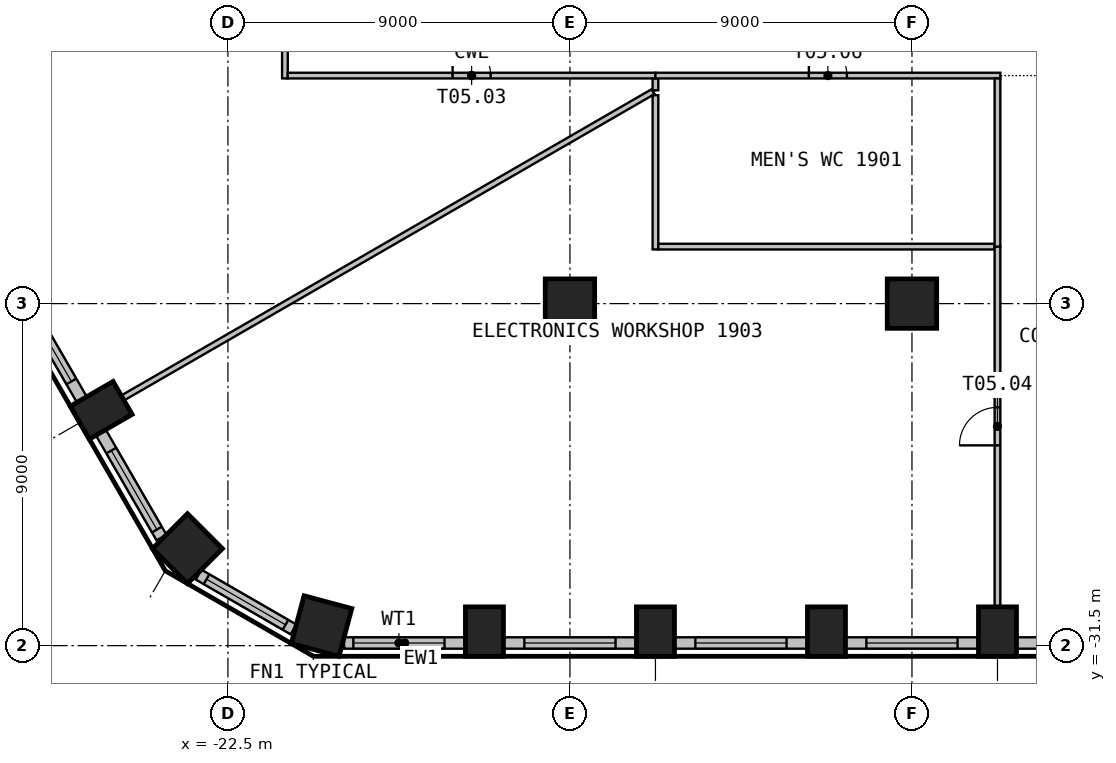
"""IFC4 building model, lengths in metres.
Left out: names, types, materials, properties, quantities, classifications, styles, units other than length and angle.
Written with IfcOpenShell. Run it as: python <this file> out.ifc"""

import sys

from ifc_helpers import new_model, si_unit, direction, frame, frame_2d, origin, origin_2d, place, context, subcontext, project, spatial, rectangle, circle, extrude, element, fill, save


model = new_model("IFC4")
c1 = context("Model", 3, precision=1e-05, world=origin(), true_north=direction((0.0, 1.0)))
c2 = subcontext(c1, "Body", "Model", "MODEL_VIEW")
j1 = project(units=[si_unit("LENGTHUNIT", "METRE"), si_unit("PLANEANGLEUNIT", "RADIAN")], contexts=[c1])
p1 = place(None, origin())
s1 = spatial("IfcSite", under=j1, at=p1, CompositionType="ELEMENT")
p2 = place(p1, origin())
s2 = spatial("IfcBuilding", under=s1, at=p2, CompositionType="ELEMENT")
p3 = place(p2, frame((0.0, 0.0, 81.3)))
s3 = spatial("IfcBuildingStorey", under=s2, at=p3, CompositionType="ELEMENT", Elevation=81.3)
p4 = place(p3, frame((-20.037, -30.984, 0.0), z_axis=(0.0, 0.0, 1.0), x_axis=(0.965925826289, -0.258819045103, 0.0)))
e1 = element("IfcColumn", 1, at=p4, inside=s3, PredefinedType="COLUMN", context=c2, shape_type="SweptSolid", body=[
    extrude(rectangle(XDim=1.3, YDim=1.3, at=origin_2d()), origin(), (0.0, 0.0, 1.0), 3.525),
])
for number, where, z_axis, x_axis in (
    (2, (-15.75, -31.13, 0.0), (0.0, 0.0, 1.0), (1.0, 0.0, 0.0)),
    (3, (-11.25, -31.13, 0.0), (0.0, 0.0, 1.0), (1.0, 0.0, 0.0)),
    (4, (-6.75, -31.13, 0.0), (0.0, 0.0, 1.0), (1.0, 0.0, 0.0)),
    (5, (-2.25, -31.13, 0.0), (0.0, 0.0, 1.0), (1.0, 0.0, 0.0)),
    (6, (-25.834, -25.308, 0.0), (0.0, 0.0, 1.0), (0.5, -0.866, 0.0)),
):
    element("IfcColumn", number, at=place(p3, frame(where, z_axis=z_axis, x_axis=x_axis)), inside=s3, PredefinedType="COLUMN", context=c2, shape_type="SweptSolid", body=[
        extrude(rectangle(XDim=1.0, YDim=1.3, at=origin_2d()), origin(), (0.0, 0.0, 1.0), 3.525),
    ])
p5 = place(p3, frame((-23.564, -28.947, 0.0), z_axis=(0.0, 0.0, 1.0), x_axis=(0.707106781187, -0.707106781187, 0.0)))
e7 = element("IfcColumn", 7, at=p5, inside=s3, PredefinedType="COLUMN", context=c2, shape_type="SweptSolid", body=[
    extrude(rectangle(XDim=1.3, YDim=1.3, at=origin_2d()), origin(), (0.0, 0.0, 1.0), 3.525),
])
for number, where, z_axis, x_axis in (
    (8, (-13.5, -22.5, 0.0), (0.0, 0.0, 1.0), (1.0, 0.0, 0.0)),
    (9, (-4.5, -22.5, 0.0), (0.0, 0.0, 1.0), (1.0, 0.0, 0.0)),
):
    element("IfcColumn", number, at=place(p3, frame(where, z_axis=z_axis, x_axis=x_axis)), inside=s3, PredefinedType="COLUMN", context=c2, shape_type="SweptSolid", body=[
        extrude(circle(Radius=0.65, at=origin_2d()), origin(), (0.0, 0.0, 1.0), 3.525),
    ])
p6 = place(p3, frame((-19.443, -31.43, 0.0), z_axis=(0.0, 0.0, 1.0), x_axis=(1.0, 0.0, 0.0)))
e10 = element("IfcWall", 10, at=p6, inside=s3, PredefinedType="SOLIDWALL", context=c2, shape_type="SweptSolid", body=[
    extrude(rectangle(XDim=3.192, YDim=0.3, at=frame_2d((1.596, 0.0))), origin(), (0.0, 0.0, 1.0), 3.525),
])
p7 = place(p6, frame((0.243, 0.0, 0.9)))
e11 = element("IfcOpeningElement", 11, at=p7, cuts=e10, PredefinedType="OPENING", context=c2, shape_type="SweptSolid", body=[
    extrude(rectangle(XDim=2.4, YDim=2.1, at=frame_2d((1.2, 1.05))), frame((0.0, 0.16, 0.0), z_axis=(0.0, -1.0, 0.0), x_axis=(1.0, 0.0, 0.0)), (0.0, 0.0, 1.0), 0.32),
])
p8 = place(p3, frame((-15.25, -31.43, 0.0), z_axis=(0.0, 0.0, 1.0), x_axis=(1.0, 0.0, 0.0)))
e12 = element("IfcWall", 12, at=p8, inside=s3, PredefinedType="SOLIDWALL", context=c2, shape_type="SweptSolid", body=[
    extrude(rectangle(XDim=3.499, YDim=0.3, at=frame_2d((1.75, 0.0))), origin(), (0.0, 0.0, 1.0), 3.525),
])
p9 = place(p8, frame((0.55, 0.0, 0.9)))
e13 = element("IfcOpeningElement", 13, at=p9, cuts=e12, PredefinedType="OPENING", context=c2, shape_type="SweptSolid", body=[
    extrude(rectangle(XDim=2.4, YDim=2.1, at=frame_2d((1.2, 1.05))), frame((0.0, 0.16, 0.0), z_axis=(0.0, -1.0, 0.0), x_axis=(1.0, 0.0, 0.0)), (0.0, 0.0, 1.0), 0.32),
])
p10 = place(p3, frame((-10.75, -31.43, 0.0), z_axis=(0.0, 0.0, 1.0), x_axis=(1.0, 0.0, 0.0)))
e14 = element("IfcWall", 14, at=p10, inside=s3, PredefinedType="SOLIDWALL", context=c2, shape_type="SweptSolid", body=[
    extrude(rectangle(XDim=3.499, YDim=0.3, at=frame_2d((1.75, 0.0))), origin(), (0.0, 0.0, 1.0), 3.525),
])
p11 = place(p10, frame((0.55, 0.0, 0.9)))
e15 = element("IfcOpeningElement", 15, at=p11, cuts=e14, PredefinedType="OPENING", context=c2, shape_type="SweptSolid", body=[
    extrude(rectangle(XDim=2.4, YDim=2.1, at=frame_2d((1.2, 1.05))), frame((0.0, 0.16, 0.0), z_axis=(0.0, -1.0, 0.0), x_axis=(1.0, 0.0, 0.0)), (0.0, 0.0, 1.0), 0.32),
])
p12 = place(p3, frame((-6.25, -31.43, 0.0), z_axis=(0.0, 0.0, 1.0), x_axis=(1.0, 0.0, 0.0)))
e16 = element("IfcWall", 16, at=p12, inside=s3, PredefinedType="SOLIDWALL", context=c2, shape_type="SweptSolid", body=[
    extrude(rectangle(XDim=3.499, YDim=0.3, at=frame_2d((1.75, 0.0))), origin(), (0.0, 0.0, 1.0), 3.525),
])
p13 = place(p12, frame((0.55, 0.0, 0.9)))
e17 = element("IfcOpeningElement", 17, at=p13, cuts=e16, PredefinedType="OPENING", context=c2, shape_type="SweptSolid", body=[
    extrude(rectangle(XDim=2.4, YDim=2.1, at=frame_2d((1.2, 1.05))), frame((0.0, 0.16, 0.0), z_axis=(0.0, -1.0, 0.0), x_axis=(1.0, 0.0, 0.0)), (0.0, 0.0, 1.0), 0.32),
])
p14 = place(p3, frame((-1.75, -31.43, 0.0), z_axis=(0.0, 0.0, 1.0), x_axis=(1.0, 0.0, 0.0)))
e18 = element("IfcWall", 18, at=p14, inside=s3, PredefinedType="SOLIDWALL", context=c2, shape_type="SweptSolid", body=[
    extrude(rectangle(XDim=3.499, YDim=0.3, at=frame_2d((1.75, 0.0))), origin(), (0.0, 0.0, 1.0), 3.525),
])
p15 = place(p14, frame((0.55, 0.0, 0.9)))
e19 = element("IfcOpeningElement", 19, at=p15, cuts=e18, PredefinedType="OPENING", context=c2, shape_type="SweptSolid", body=[
    extrude(rectangle(XDim=2.4, YDim=2.1, at=frame_2d((1.2, 1.05))), frame((0.0, 0.16, 0.0), z_axis=(0.0, -1.0, 0.0), x_axis=(1.0, 0.0, 0.0)), (0.0, 0.0, 1.0), 0.32),
])
p16 = place(p3, frame((-28.094, -21.994, 0.0), z_axis=(0.0, 0.0, 1.0), x_axis=(0.499996256241, -0.866027565234, 0.0)))
e20 = element("IfcWall", 20, at=p16, inside=s3, PredefinedType="SOLIDWALL", context=c2, shape_type="SweptSolid", body=[
    extrude(rectangle(XDim=3.499, YDim=0.3, at=frame_2d((1.75, 0.0))), origin(), (0.0, 0.0, 1.0), 3.525),
])
p17 = place(p16, frame((0.55, 0.0, 0.9)))
e21 = element("IfcOpeningElement", 21, at=p17, cuts=e20, PredefinedType="OPENING", context=c2, shape_type="SweptSolid", body=[
    extrude(rectangle(XDim=2.4, YDim=2.1, at=frame_2d((1.2, 1.05))), frame((0.0, 0.16, 0.0), z_axis=(0.0, -1.0, 0.0), x_axis=(1.0, 0.0, 0.0)), (0.0, 0.0, 1.0), 0.32),
])
p18 = place(p3, frame((-25.844, -25.891, 0.0), z_axis=(0.0, 0.0, 1.0), x_axis=(0.500004907028, -0.866022570692, 0.0)))
e22 = element("IfcWall", 22, at=p18, inside=s3, PredefinedType="SOLIDWALL", context=c2, shape_type="SweptSolid", body=[
    extrude(rectangle(XDim=3.192, YDim=0.3, at=frame_2d((1.596, 0.0))), origin(), (0.0, 0.0, 1.0), 3.525),
])
p19 = place(p18, frame((0.55, 0.0, 0.9)))
e23 = element("IfcOpeningElement", 23, at=p19, cuts=e22, PredefinedType="OPENING", context=c2, shape_type="SweptSolid", body=[
    extrude(rectangle(XDim=2.4, YDim=2.1, at=frame_2d((1.2, 1.05))), frame((0.0, 0.16, 0.0), z_axis=(0.0, -1.0, 0.0), x_axis=(1.0, 0.0, 0.0)), (0.0, 0.0, 1.0), 0.32),
])
p20 = place(p3, frame((-23.273, -29.63, 0.0), z_axis=(0.0, 0.0, 1.0), x_axis=(0.866053149362, -0.49995194017, 0.0)))
e24 = element("IfcWall", 24, at=p20, inside=s3, PredefinedType="SOLIDWALL", context=c2, shape_type="SweptSolid", body=[
    extrude(rectangle(XDim=2.885, YDim=0.3, at=frame_2d((1.443, 0.0))), origin(), (0.0, 0.0, 1.0), 3.525),
])
p21 = place(p20, frame((0.243, 0.0, 0.9)))
e25 = element("IfcOpeningElement", 25, at=p21, cuts=e24, PredefinedType="OPENING", context=c2, shape_type="SweptSolid", body=[
    extrude(rectangle(XDim=2.4, YDim=2.1, at=frame_2d((1.2, 1.05))), frame((0.0, 0.16, 0.0), z_axis=(0.0, -1.0, 0.0), x_axis=(1.0, 0.0, 0.0)), (0.0, 0.0, 1.0), 0.32),
])
p22 = place(p3, frame((-11.315, -16.925, 0.0), z_axis=(0.0, 0.0, 1.0), x_axis=(-0.86600725109, -0.500031440071, 0.0)))
e26 = element("IfcWall", 26, at=p22, inside=s3, PredefinedType="PARTITIONING", context=c2, shape_type="SweptSolid", body=[
    extrude(rectangle(XDim=16.096, YDim=0.15, at=frame_2d((8.048, 0.0))), origin(), (0.0, 0.0, 1.0), 3.525),
])
p23 = place(p3, frame((-21.0, -7.058, 0.0), z_axis=(0.0, 0.0, 1.0), x_axis=(0.0, -1.0, 0.0)))
e27 = element("IfcWall", 27, at=p23, inside=s3, PredefinedType="PARTITIONING", context=c2, shape_type="SweptSolid", body=[
    extrude(rectangle(XDim=9.517, YDim=0.15, at=frame_2d((4.758, 0.0))), origin(), (0.0, 0.0, 1.0), 3.525),
])
p24 = place(p3, frame((-20.925, -16.5, 0.0), z_axis=(0.0, 0.0, 1.0), x_axis=(1.0, 0.0, 0.0)))
e28 = element("IfcWall", 28, at=p24, inside=s3, PredefinedType="PARTITIONING", context=c2, shape_type="SweptSolid", body=[
    extrude(rectangle(XDim=9.675, YDim=0.15, at=frame_2d((4.837, 0.0))), origin(), (0.0, 0.0, 1.0), 3.525),
])
p25 = place(p24, frame((4.337, 0.0, 0.0)))
e29 = element("IfcOpeningElement", 29, at=p25, cuts=e28, PredefinedType="OPENING", context=c2, shape_type="SweptSolid", body=[
    extrude(rectangle(XDim=1.0, YDim=2.1, at=frame_2d((0.5, 1.05))), frame((0.0, 0.085, 0.0), z_axis=(0.0, -1.0, 0.0), x_axis=(1.0, 0.0, 0.0)), (0.0, 0.0, 1.0), 0.17),
])
p26 = place(p3, frame((-11.25, -17.017, 0.0), z_axis=(0.0, 0.0, 1.0), x_axis=(0.0, -1.0, 0.0)))
e30 = element("IfcWall", 30, at=p26, inside=s3, PredefinedType="PARTITIONING", context=c2, shape_type="SweptSolid", body=[
    extrude(rectangle(XDim=4.058, YDim=0.15, at=frame_2d((2.029, 0.0))), origin(), (0.0, 0.0, 1.0), 3.525),
])
p27 = place(p3, frame((-11.175, -21.0, 0.0), z_axis=(0.0, 0.0, 1.0), x_axis=(1.0, 0.0, 0.0)))
e31 = element("IfcWall", 31, at=p27, inside=s3, PredefinedType="PARTITIONING", context=c2, shape_type="SweptSolid", body=[
    extrude(rectangle(XDim=8.85, YDim=0.15, at=frame_2d((4.425, 0.0))), origin(), (0.0, 0.0, 1.0), 3.525),
])
p28 = place(p3, frame((-11.25, -16.575, 0.0), z_axis=(0.0, 0.0, 1.0), x_axis=(0.0, -1.0, 0.0)))
e32 = element("IfcWall", 32, at=p28, inside=s3, PredefinedType="PARTITIONING", context=c2, shape_type="SweptSolid", body=[
    extrude(rectangle(XDim=0.312, YDim=0.15, at=frame_2d((0.156, 0.0))), origin(), (0.0, 0.0, 1.0), 3.525),
])
p29 = place(p3, frame((-11.25, -16.5, 0.0), z_axis=(0.0, 0.0, 1.0), x_axis=(1.0, 0.0, 0.0)))
e33 = element("IfcWall", 33, at=p29, inside=s3, PredefinedType="PARTITIONING", context=c2, shape_type="SweptSolid", body=[
    extrude(rectangle(XDim=9.075, YDim=0.15, at=frame_2d((4.538, 0.0))), origin(), (0.0, 0.0, 1.0), 3.525),
])
p30 = place(p29, frame((4.038, 0.0, 0.0)))
e34 = element("IfcOpeningElement", 34, at=p30, cuts=e33, PredefinedType="OPENING", context=c2, shape_type="SweptSolid", body=[
    extrude(rectangle(XDim=1.0, YDim=2.1, at=frame_2d((0.5, 1.05))), frame((0.0, 0.085, 0.0), z_axis=(0.0, -1.0, 0.0), x_axis=(1.0, 0.0, 0.0)), (0.0, 0.0, 1.0), 0.17),
])
p31 = place(p3, frame((-2.25, -30.46, 0.0), z_axis=(0.0, 0.0, 1.0), x_axis=(0.0, 1.0, 0.0)))
e35 = element("IfcWall", 35, at=p31, inside=s3, PredefinedType="PARTITIONING", context=c2, shape_type="SweptSolid", body=[
    extrude(rectangle(XDim=9.46, YDim=0.15, at=frame_2d((4.73, 0.0))), origin(), (0.0, 0.0, 1.0), 3.525),
])
p32 = place(p31, frame((4.23, 0.0, 0.0)))
e36 = element("IfcOpeningElement", 36, at=p32, cuts=e35, PredefinedType="OPENING", context=c2, shape_type="SweptSolid", body=[
    extrude(rectangle(XDim=1.0, YDim=2.1, at=frame_2d((0.5, 1.05))), frame((0.0, 0.085, 0.0), z_axis=(0.0, -1.0, 0.0), x_axis=(1.0, 0.0, 0.0)), (0.0, 0.0, 1.0), 0.17),
])
p33 = place(p3, frame((-2.25, -21.0, 0.0), z_axis=(0.0, 0.0, 1.0), x_axis=(0.0, 1.0, 0.0)))
e37 = element("IfcWall", 37, at=p33, inside=s3, PredefinedType="PARTITIONING", context=c2, shape_type="SweptSolid", body=[
    extrude(rectangle(XDim=4.425, YDim=0.15, at=frame_2d((2.212, 0.0))), origin(), (0.0, 0.0, 1.0), 3.525),
])
p34 = place(p7, origin())
e38 = element("IfcWindow", 38, at=p34, inside=s3, PartitioningType="SINGLE_PANEL", PredefinedType="WINDOW", context=c2, shape_type="SweptSolid", body=[
    extrude(rectangle(XDim=2.4, YDim=2.1, at=frame_2d((1.2, 1.05))), frame((0.0, 0.03, 0.0), z_axis=(0.0, -1.0, 0.0), x_axis=(1.0, 0.0, 0.0)), (0.0, 0.0, 1.0), 0.06),
])
fill(e11, e38)
p35 = place(p9, origin())
e39 = element("IfcWindow", 39, at=p35, inside=s3, PartitioningType="SINGLE_PANEL", PredefinedType="WINDOW", context=c2, shape_type="SweptSolid", body=[
    extrude(rectangle(XDim=2.4, YDim=2.1, at=frame_2d((1.2, 1.05))), frame((0.0, 0.03, 0.0), z_axis=(0.0, -1.0, 0.0), x_axis=(1.0, 0.0, 0.0)), (0.0, 0.0, 1.0), 0.06),
])
fill(e13, e39)
p36 = place(p11, origin())
e40 = element("IfcWindow", 40, at=p36, inside=s3, PartitioningType="SINGLE_PANEL", PredefinedType="WINDOW", context=c2, shape_type="SweptSolid", body=[
    extrude(rectangle(XDim=2.4, YDim=2.1, at=frame_2d((1.2, 1.05))), frame((0.0, 0.03, 0.0), z_axis=(0.0, -1.0, 0.0), x_axis=(1.0, 0.0, 0.0)), (0.0, 0.0, 1.0), 0.06),
])
fill(e15, e40)
p37 = place(p13, origin())
e41 = element("IfcWindow", 41, at=p37, inside=s3, PartitioningType="SINGLE_PANEL", PredefinedType="WINDOW", context=c2, shape_type="SweptSolid", body=[
    extrude(rectangle(XDim=2.4, YDim=2.1, at=frame_2d((1.2, 1.05))), frame((0.0, 0.03, 0.0), z_axis=(0.0, -1.0, 0.0), x_axis=(1.0, 0.0, 0.0)), (0.0, 0.0, 1.0), 0.06),
])
fill(e17, e41)
p38 = place(p17, origin())
e42 = element("IfcWindow", 42, at=p38, inside=s3, PartitioningType="SINGLE_PANEL", PredefinedType="WINDOW", context=c2, shape_type="SweptSolid", body=[
    extrude(rectangle(XDim=2.4, YDim=2.1, at=frame_2d((1.2, 1.05))), frame((0.0, 0.03, 0.0), z_axis=(0.0, -1.0, 0.0), x_axis=(1.0, 0.0, 0.0)), (0.0, 0.0, 1.0), 0.06),
])
fill(e21, e42)
p39 = place(p19, origin())
e43 = element("IfcWindow", 43, at=p39, inside=s3, PartitioningType="SINGLE_PANEL", PredefinedType="WINDOW", context=c2, shape_type="SweptSolid", body=[
    extrude(rectangle(XDim=2.4, YDim=2.1, at=frame_2d((1.2, 1.05))), frame((0.0, 0.03, 0.0), z_axis=(0.0, -1.0, 0.0), x_axis=(1.0, 0.0, 0.0)), (0.0, 0.0, 1.0), 0.06),
])
fill(e23, e43)
p40 = place(p21, origin())
e44 = element("IfcWindow", 44, at=p40, inside=s3, PartitioningType="SINGLE_PANEL", PredefinedType="WINDOW", context=c2, shape_type="SweptSolid", body=[
    extrude(rectangle(XDim=2.4, YDim=2.1, at=frame_2d((1.2, 1.05))), frame((0.0, 0.03, 0.0), z_axis=(0.0, -1.0, 0.0), x_axis=(1.0, 0.0, 0.0)), (0.0, 0.0, 1.0), 0.06),
])
fill(e25, e44)
p41 = place(p25, origin())
e45 = element("IfcDoor", 45, at=p41, inside=s3, OperationType="SINGLE_SWING_LEFT", PredefinedType="DOOR", context=c2, shape_type="SweptSolid", body=[
    extrude(rectangle(XDim=1.0, YDim=2.1, at=frame_2d((0.5, 1.05))), frame((0.0, 0.025, 0.0), z_axis=(0.0, -1.0, 0.0), x_axis=(1.0, 0.0, 0.0)), (0.0, 0.0, 1.0), 0.05),
])
fill(e29, e45)
p42 = place(p32, origin())
e46 = element("IfcDoor", 46, at=p42, inside=s3, OperationType="SINGLE_SWING_RIGHT", PredefinedType="DOOR", context=c2, shape_type="SweptSolid", body=[
    extrude(rectangle(XDim=1.0, YDim=2.1, at=frame_2d((0.5, 1.05))), frame((0.0, 0.025, 0.0), z_axis=(0.0, -1.0, 0.0), x_axis=(1.0, 0.0, 0.0)), (0.0, 0.0, 1.0), 0.05),
])
fill(e36, e46)
p43 = place(p30, origin())
e47 = element("IfcDoor", 47, at=p43, inside=s3, OperationType="SINGLE_SWING_RIGHT", PredefinedType="DOOR", context=c2, shape_type="SweptSolid", body=[
    extrude(rectangle(XDim=1.0, YDim=2.1, at=frame_2d((0.5, 1.05))), frame((0.0, 0.025, 0.0), z_axis=(0.0, -1.0, 0.0), x_axis=(1.0, 0.0, 0.0)), (0.0, 0.0, 1.0), 0.05),
])
fill(e34, e47)
save(model, sys.argv[1])
